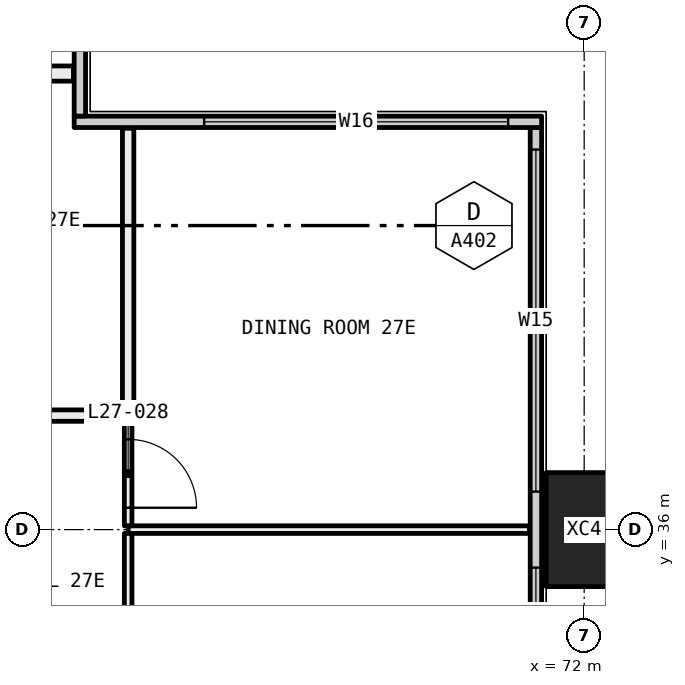
"""IFC4 building model, lengths in metres.
Left out: names, types, materials, properties, quantities, classifications, styles, units other than length and angle.
Written with IfcOpenShell. Run it as: python <this file> out.ifc"""

import sys

from ifc_helpers import new_model, si_unit, direction, frame, frame_2d, origin, origin_2d, place, context, subcontext, project, spatial, rectangle, hollow_rectangle, extrude, element, fill, save


model = new_model("IFC4")
c1 = context("Model", 3, precision=1e-05, world=origin(), true_north=direction((0.0, 1.0)))
c2 = subcontext(c1, "Body", "Model", "MODEL_VIEW")
j1 = project(units=[si_unit("LENGTHUNIT", "METRE"), si_unit("PLANEANGLEUNIT", "RADIAN")], contexts=[c1])
p1 = place(None, origin())
s1 = spatial("IfcSite", under=j1, at=p1, CompositionType="ELEMENT")
p2 = place(p1, origin())
s2 = spatial("IfcBuilding", under=s1, at=p2, CompositionType="ELEMENT")
p3 = place(p2, frame((0.0, 0.0, 106.95)))
s3 = spatial("IfcBuildingStorey", under=s2, at=p3, CompositionType="ELEMENT", Elevation=106.95)
p4 = place(p3, frame((72.0, 36.0, -0.4), z_axis=(0.0, 0.0, 1.0), x_axis=(0.0, 1.0, 0.0)))
e1 = element("IfcColumn", 1, at=p4, inside=s3, PredefinedType="COLUMN", context=c2, shape_type="SweptSolid", body=[
    extrude(hollow_rectangle(XDim=1.5, YDim=1.0, WallThickness=0.06, at=origin_2d()), origin(), (0.0, 0.0, 1.0), 3.45),
])
p5 = place(p3, frame((71.365, 18.71, 0.0), z_axis=(0.0, 0.0, 1.0), x_axis=(0.0, 1.0, 0.0)))
e2 = element("IfcWall", 2, at=p5, inside=s3, PredefinedType="ELEMENTEDWALL", context=c2, shape_type="SweptSolid", body=[
    extrude(rectangle(XDim=22.58, YDim=0.15, at=frame_2d((11.29, 0.0))), origin(), (0.0, 0.0, 1.0), 3.05),
])
p6 = place(p5, frame((0.29, 0.0, 0.45)))
e3 = element("IfcOpeningElement", 3, at=p6, cuts=e2, PredefinedType="OPENING", context=c2, shape_type="SweptSolid", body=[
    extrude(rectangle(XDim=4.5, YDim=2.55, at=frame_2d((2.25, 1.275))), frame((0.0, 0.085, 0.0), z_axis=(0.0, -1.0, 0.0), x_axis=(1.0, 0.0, 0.0)), (0.0, 0.0, 1.0), 0.17),
])
p7 = place(p5, frame((5.79, 0.0, 0.45)))
e4 = element("IfcOpeningElement", 4, at=p7, cuts=e2, PredefinedType="OPENING", context=c2, shape_type="SweptSolid", body=[
    extrude(rectangle(XDim=1.25, YDim=2.55, at=frame_2d((0.625, 1.275))), frame((0.0, 0.085, 0.0), z_axis=(0.0, -1.0, 0.0), x_axis=(1.0, 0.0, 0.0)), (0.0, 0.0, 1.0), 0.17),
])
p8 = place(p5, frame((15.54, 0.0, 0.45)))
e5 = element("IfcOpeningElement", 5, at=p8, cuts=e2, PredefinedType="OPENING", context=c2, shape_type="SweptSolid", body=[
    extrude(rectangle(XDim=1.25, YDim=2.55, at=frame_2d((0.625, 1.275))), frame((0.0, 0.085, 0.0), z_axis=(0.0, -1.0, 0.0), x_axis=(1.0, 0.0, 0.0)), (0.0, 0.0, 1.0), 0.17),
])
p9 = place(p5, frame((17.79, 0.0, 0.45)))
e6 = element("IfcOpeningElement", 6, at=p9, cuts=e2, PredefinedType="OPENING", context=c2, shape_type="SweptSolid", body=[
    extrude(rectangle(XDim=4.5, YDim=2.55, at=frame_2d((2.25, 1.275))), frame((0.0, 0.085, 0.0), z_axis=(0.0, -1.0, 0.0), x_axis=(1.0, 0.0, 0.0)), (0.0, 0.0, 1.0), 0.17),
])
p10 = place(p3, frame((65.29, 41.365, 0.0), z_axis=(0.0, 0.0, 1.0), x_axis=(1.0, 0.0, 0.0)))
e7 = element("IfcWall", 7, at=p10, inside=s3, PredefinedType="ELEMENTEDWALL", context=c2, shape_type="SweptSolid", body=[
    extrude(rectangle(XDim=6.15, YDim=0.15, at=frame_2d((3.075, 0.0))), origin(), (0.0, 0.0, 1.0), 3.05),
])
p11 = place(p10, frame((1.71, 0.0, 0.45)))
e8 = element("IfcOpeningElement", 8, at=p11, cuts=e7, PredefinedType="OPENING", context=c2, shape_type="SweptSolid", body=[
    extrude(rectangle(XDim=4.0, YDim=2.55, at=frame_2d((2.0, 1.275))), frame((0.0, 0.085, 0.0), z_axis=(0.0, -1.0, 0.0), x_axis=(1.0, 0.0, 0.0)), (0.0, 0.0, 1.0), 0.17),
])
p12 = place(p3, frame((65.365, 41.44, 0.0), z_axis=(0.0, 0.0, 1.0), x_axis=(0.0, 1.0, 0.0)))
e9 = element("IfcWall", 9, at=p12, inside=s3, PredefinedType="ELEMENTEDWALL", context=c2, shape_type="SweptSolid", body=[
    extrude(rectangle(XDim=5.85, YDim=0.15, at=frame_2d((2.925, 0.0))), origin(), (0.0, 0.0, 1.0), 3.05),
])
p13 = place(p12, frame((1.56, 0.0, 0.45)))
e10 = element("IfcOpeningElement", 10, at=p13, cuts=e9, PredefinedType="OPENING", context=c2, shape_type="SweptSolid", body=[
    extrude(rectangle(XDim=4.0, YDim=2.55, at=frame_2d((2.0, 1.275))), frame((0.0, 0.085, 0.0), z_axis=(0.0, -1.0, 0.0), x_axis=(1.0, 0.0, 0.0)), (0.0, 0.0, 1.0), 0.17),
])
p14 = place(p3, frame((71.28, 36.0, 0.0), z_axis=(0.0, 0.0, 1.0), x_axis=(-1.0, 0.0, 0.0)))
e11 = element("IfcWall", 11, at=p14, inside=s3, PredefinedType="PARTITIONING", context=c2, shape_type="SweptSolid", body=[
    extrude(rectangle(XDim=5.28, YDim=0.1, at=frame_2d((2.64, 0.0))), origin(), (0.0, 0.0, 1.0), 2.45),
])
p15 = place(p3, frame((66.0, 35.95, 0.0), z_axis=(0.0, 0.0, 1.0), x_axis=(0.0, -1.0, 0.0)))
e12 = element("IfcWall", 12, at=p15, inside=s3, PredefinedType="PARTITIONING", context=c2, shape_type="SweptSolid", body=[
    extrude(rectangle(XDim=2.95, YDim=0.1, at=frame_2d((1.475, 0.0))), origin(), (0.0, 0.0, 1.0), 2.45),
])
p16 = place(p15, frame((1.025, 0.0, 0.0)))
e13 = element("IfcOpeningElement", 13, at=p16, cuts=e12, PredefinedType="OPENING", context=c2, shape_type="SweptSolid", body=[
    extrude(rectangle(XDim=0.9, YDim=2.1, at=frame_2d((0.45, 1.05))), frame((0.0, 0.06, 0.0), z_axis=(0.0, -1.0, 0.0), x_axis=(1.0, 0.0, 0.0)), (0.0, 0.0, 1.0), 0.12),
])
p17 = place(p3, frame((66.0, 37.425, 0.0), z_axis=(0.0, 0.0, 1.0), x_axis=(0.0, -1.0, 0.0)))
e14 = element("IfcWall", 14, at=p17, inside=s3, PredefinedType="PARTITIONING", context=c2, shape_type="SweptSolid", body=[
    extrude(rectangle(XDim=1.375, YDim=0.1, at=frame_2d((0.688, 0.0))), origin(), (0.0, 0.0, 1.0), 2.45),
])
p18 = place(p17, frame((0.238, 0.0, 0.0)))
e15 = element("IfcOpeningElement", 15, at=p18, cuts=e14, PredefinedType="OPENING", context=c2, shape_type="SweptSolid", body=[
    extrude(rectangle(XDim=0.9, YDim=2.1, at=frame_2d((0.45, 1.05))), frame((0.0, 0.06, 0.0), z_axis=(0.0, -1.0, 0.0), x_axis=(1.0, 0.0, 0.0)), (0.0, 0.0, 1.0), 0.12),
])
p19 = place(p3, frame((66.0, 41.28, 0.0), z_axis=(0.0, 0.0, 1.0), x_axis=(0.0, -1.0, 0.0)))
e16 = element("IfcWall", 16, at=p19, inside=s3, PredefinedType="PARTITIONING", context=c2, shape_type="SweptSolid", body=[
    extrude(rectangle(XDim=3.78, YDim=0.15, at=frame_2d((1.89, 0.0))), origin(), (0.0, 0.0, 1.0), 3.05),
])
p20 = place(p3, frame((65.925, 37.5, 0.0), z_axis=(0.0, 0.0, 1.0), x_axis=(-1.0, 0.0, 0.0)))
e17 = element("IfcWall", 17, at=p20, inside=s3, PredefinedType="PARTITIONING", context=c2, shape_type="SweptSolid", body=[
    extrude(rectangle(XDim=3.925, YDim=0.15, at=frame_2d((1.962, 0.0))), origin(), (0.0, 0.0, 1.0), 3.05),
])
p21 = place(p20, frame((1.512, 0.0, 0.0)))
e18 = element("IfcOpeningElement", 18, at=p21, cuts=e17, PredefinedType="OPENING", context=c2, shape_type="SweptSolid", body=[
    extrude(rectangle(XDim=0.9, YDim=2.1, at=frame_2d((0.45, 1.05))), frame((0.0, 0.085, 0.0), z_axis=(0.0, -1.0, 0.0), x_axis=(1.0, 0.0, 0.0)), (0.0, 0.0, 1.0), 0.17),
])
p22 = place(p3, frame((65.28, 42.0, 0.0), z_axis=(0.0, 0.0, 1.0), x_axis=(-1.0, 0.0, 0.0)))
e19 = element("IfcWall", 19, at=p22, inside=s3, PredefinedType="PARTITIONING", context=c2, shape_type="SweptSolid", body=[
    extrude(rectangle(XDim=3.38, YDim=0.2, at=frame_2d((1.69, 0.0))), origin(), (0.0, 0.0, 1.0), 3.05),
])
p23 = place(p8, origin())
e20 = element("IfcWindow", 20, at=p23, inside=s3, PartitioningType="SINGLE_PANEL", PredefinedType="WINDOW", context=c2, shape_type="SweptSolid", body=[
    extrude(rectangle(XDim=1.25, YDim=2.55, at=frame_2d((0.625, 1.275))), frame((0.0, 0.03, 0.0), z_axis=(0.0, -1.0, 0.0), x_axis=(1.0, 0.0, 0.0)), (0.0, 0.0, 1.0), 0.06),
])
fill(e5, e20)
p24 = place(p9, origin())
e21 = element("IfcWindow", 21, at=p24, inside=s3, PartitioningType="SINGLE_PANEL", PredefinedType="WINDOW", context=c2, shape_type="SweptSolid", body=[
    extrude(rectangle(XDim=4.5, YDim=2.55, at=frame_2d((2.25, 1.275))), frame((0.0, 0.03, 0.0), z_axis=(0.0, -1.0, 0.0), x_axis=(1.0, 0.0, 0.0)), (0.0, 0.0, 1.0), 0.06),
])
fill(e6, e21)
p25 = place(p11, origin())
e22 = element("IfcWindow", 22, at=p25, inside=s3, PartitioningType="SINGLE_PANEL", PredefinedType="WINDOW", context=c2, shape_type="SweptSolid", body=[
    extrude(rectangle(XDim=4.0, YDim=2.55, at=frame_2d((2.0, 1.275))), frame((0.0, 0.03, 0.0), z_axis=(0.0, -1.0, 0.0), x_axis=(1.0, 0.0, 0.0)), (0.0, 0.0, 1.0), 0.06),
])
fill(e8, e22)
p26 = place(p18, origin())
e23 = element("IfcDoor", 23, at=p26, inside=s3, OperationType="SINGLE_SWING_LEFT", PredefinedType="DOOR", context=c2, shape_type="SweptSolid", body=[
    extrude(rectangle(XDim=0.9, YDim=2.1, at=frame_2d((0.45, 1.05))), frame((0.0, 0.025, 0.0), z_axis=(0.0, -1.0, 0.0), x_axis=(1.0, 0.0, 0.0)), (0.0, 0.0, 1.0), 0.05),
])
fill(e15, e23)
save(model, sys.argv[1])
